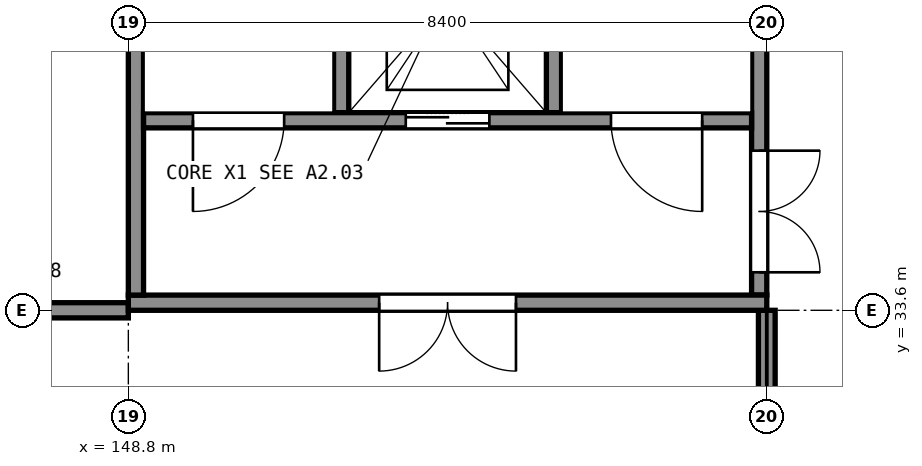
"""IFC4 building model, lengths in metres.
Left out: names, types, materials, properties, quantities, classifications, styles, units other than length and angle.
Written with IfcOpenShell. Run it as: python <this file> out.ifc"""

import sys

from ifc_helpers import new_model, si_unit, direction, frame, frame_2d, origin, place, context, subcontext, project, spatial, rectangle, extrude, element, fill, save


model = new_model("IFC4")
c1 = context("Model", 3, precision=1e-05, world=origin(), true_north=direction((0.0, 1.0)))
c2 = subcontext(c1, "Body", "Model", "MODEL_VIEW")
j1 = project(units=[si_unit("LENGTHUNIT", "METRE"), si_unit("PLANEANGLEUNIT", "RADIAN")], contexts=[c1])
p1 = place(None, origin())
s1 = spatial("IfcSite", under=j1, at=p1, CompositionType="ELEMENT")
p2 = place(p1, origin())
s2 = spatial("IfcBuilding", under=s1, at=p2, CompositionType="ELEMENT")
p3 = place(p2, origin())
s3 = spatial("IfcBuildingStorey", under=s2, at=p3, CompositionType="ELEMENT", Elevation=0.0)
p4 = place(p3, frame((148.8, 33.7, -1.8), z_axis=(0.0, 0.0, 1.0), x_axis=(1.0, 0.0, 0.0)))
e1 = element("IfcWall", 1, at=p4, inside=s3, PredefinedType="SHEAR", context=c2, shape_type="SweptSolid", body=[
    extrude(rectangle(XDim=8.4, YDim=0.2, at=frame_2d((4.2, 0.0))), origin(), (0.0, 0.0, 1.0), 7.3),
])
p5 = place(p4, frame((3.3, 0.0, 1.8)))
e2 = element("IfcOpeningElement", 2, at=p5, cuts=e1, PredefinedType="OPENING", context=c2, shape_type="SweptSolid", body=[
    extrude(rectangle(XDim=1.8, YDim=2.1, at=frame_2d((0.9, 1.05))), frame((0.0, 0.11, 0.0), z_axis=(0.0, -1.0, 0.0), x_axis=(1.0, 0.0, 0.0)), (0.0, 0.0, 1.0), 0.22),
])
p6 = place(p3, frame((148.9, 33.8, -1.8), z_axis=(0.0, 0.0, 1.0), x_axis=(0.0, 1.0, 0.0)))
e3 = element("IfcWall", 3, at=p6, inside=s3, PredefinedType="SHEAR", context=c2, shape_type="SweptSolid", body=[
    extrude(rectangle(XDim=8.0, YDim=0.2, at=frame_2d((4.0, 0.0))), origin(), (0.0, 0.0, 1.0), 7.3),
])
p7 = place(p3, frame((157.1, 41.8, -1.8), z_axis=(0.0, 0.0, 1.0), x_axis=(0.0, -1.0, 0.0)))
e4 = element("IfcWall", 4, at=p7, inside=s3, PredefinedType="SHEAR", context=c2, shape_type="SweptSolid", body=[
    extrude(rectangle(XDim=8.0, YDim=0.2, at=frame_2d((4.0, 0.0))), origin(), (0.0, 0.0, 1.0), 7.3),
])
p8 = place(p7, frame((6.1, 0.0, 1.8)))
e5 = element("IfcOpeningElement", 5, at=p8, cuts=e4, PredefinedType="OPENING", context=c2, shape_type="SweptSolid", body=[
    extrude(rectangle(XDim=1.6, YDim=2.1, at=frame_2d((0.8, 1.05))), frame((0.0, 0.11, 0.0), z_axis=(0.0, -1.0, 0.0), x_axis=(1.0, 0.0, 0.0)), (0.0, 0.0, 1.0), 0.22),
])
p9 = place(p3, frame((149.0, 36.1, -1.8), z_axis=(0.0, 0.0, 1.0), x_axis=(1.0, 0.0, 0.0)))
e6 = element("IfcWall", 6, at=p9, inside=s3, PredefinedType="SHEAR", context=c2, shape_type="SweptSolid", body=[
    extrude(rectangle(XDim=8.0, YDim=0.2, at=frame_2d((4.0, 0.0))), origin(), (0.0, 0.0, 1.0), 7.3),
])
p10 = place(p9, frame((0.65, 0.0, 1.8)))
e7 = element("IfcOpeningElement", 7, at=p10, cuts=e6, PredefinedType="OPENING", context=c2, shape_type="SweptSolid", body=[
    extrude(rectangle(XDim=1.2, YDim=2.1, at=frame_2d((0.6, 1.05))), frame((0.0, 0.11, 0.0), z_axis=(0.0, -1.0, 0.0), x_axis=(1.0, 0.0, 0.0)), (0.0, 0.0, 1.0), 0.22),
])
p11 = place(p9, frame((6.15, 0.0, 1.8)))
e8 = element("IfcOpeningElement", 8, at=p11, cuts=e6, PredefinedType="OPENING", context=c2, shape_type="SweptSolid", body=[
    extrude(rectangle(XDim=1.2, YDim=2.1, at=frame_2d((0.6, 1.05))), frame((0.0, 0.11, 0.0), z_axis=(0.0, -1.0, 0.0), x_axis=(1.0, 0.0, 0.0)), (0.0, 0.0, 1.0), 0.22),
])
p12 = place(p9, frame((3.45, 0.0, 1.8)))
e9 = element("IfcOpeningElement", 9, at=p12, cuts=e6, PredefinedType="OPENING", context=c2, shape_type="SweptSolid", body=[
    extrude(rectangle(XDim=1.1, YDim=2.1, at=frame_2d((0.55, 1.05))), frame((0.0, 0.11, 0.0), z_axis=(0.0, -1.0, 0.0), x_axis=(1.0, 0.0, 0.0)), (0.0, 0.0, 1.0), 0.22),
])
for number, where, z_axis, x_axis in (
    (10, (151.6, 36.2, -1.8), (0.0, 0.0, 1.0), (0.0, 1.0, 0.0)),
    (11, (154.4, 36.2, -1.8), (0.0, 0.0, 1.0), (0.0, 1.0, 0.0)),
):
    element("IfcWall", number, at=place(p3, frame(where, z_axis=z_axis, x_axis=x_axis)), inside=s3, PredefinedType="SHEAR", context=c2, shape_type="SweptSolid", body=[
        extrude(rectangle(XDim=5.6, YDim=0.2, at=frame_2d((2.8, 0.0))), origin(), (0.0, 0.0, 1.0), 7.3),
    ])
p13 = place(p3, frame((157.2, 25.6, 0.0), z_axis=(0.0, 0.0, 1.0), x_axis=(0.0, 1.0, 0.0)))
e12 = element("IfcWall", 12, at=p13, inside=s3, PredefinedType="SOLIDWALL", context=c2, shape_type="SweptSolid", body=[
    extrude(rectangle(XDim=8.0, YDim=0.22, at=frame_2d((4.0, 0.0))), origin(), (0.0, 0.0, 1.0), 4.44),
])
p14 = place(p13, frame((3.95, 0.0, 2.1)))
e13 = element("IfcOpeningElement", 13, at=p14, cuts=e12, PredefinedType="OPENING", context=c2, shape_type="SweptSolid", body=[
    extrude(rectangle(XDim=1.2, YDim=0.6, at=frame_2d((0.6, 0.3))), frame((0.0, 0.12, 0.0), z_axis=(0.0, -1.0, 0.0), x_axis=(1.0, 0.0, 0.0)), (0.0, 0.0, 1.0), 0.24),
])
p15 = place(p3, frame((144.5, 33.6, 0.0), z_axis=(0.0, 0.0, 1.0), x_axis=(1.0, 0.0, 0.0)))
e14 = element("IfcWall", 14, at=p15, inside=s3, PredefinedType="PARTITIONING", context=c2, shape_type="SweptSolid", body=[
    extrude(rectangle(XDim=4.3, YDim=0.2, at=frame_2d((2.15, 0.0))), origin(), (0.0, 0.0, 1.0), 4.4),
])
p16 = place(p15, frame((1.75, 0.0, 0.0)))
e15 = element("IfcOpeningElement", 15, at=p16, cuts=e14, PredefinedType="OPENING", context=c2, shape_type="SweptSolid", body=[
    extrude(rectangle(XDim=1.0, YDim=2.1, at=frame_2d((0.5, 1.05))), frame((0.0, 0.11, 0.0), z_axis=(0.0, -1.0, 0.0), x_axis=(1.0, 0.0, 0.0)), (0.0, 0.0, 1.0), 0.22),
])
p17 = place(p8, origin())
e16 = element("IfcDoor", 16, at=p17, inside=s3, OperationType="DOUBLE_DOOR_SINGLE_SWING", PredefinedType="DOOR", context=c2, shape_type="SweptSolid", body=[
    extrude(rectangle(XDim=1.6, YDim=2.1, at=frame_2d((0.8, 1.05))), frame((0.0, 0.025, 0.0), z_axis=(0.0, -1.0, 0.0), x_axis=(1.0, 0.0, 0.0)), (0.0, 0.0, 1.0), 0.05),
])
fill(e5, e16)
p18 = place(p5, origin())
e17 = element("IfcDoor", 17, at=p18, inside=s3, OperationType="DOUBLE_DOOR_SINGLE_SWING", PredefinedType="DOOR", context=c2, shape_type="SweptSolid", body=[
    extrude(rectangle(XDim=1.8, YDim=2.1, at=frame_2d((0.9, 1.05))), frame((0.0, 0.025, 0.0), z_axis=(0.0, -1.0, 0.0), x_axis=(1.0, 0.0, 0.0)), (0.0, 0.0, 1.0), 0.05),
])
fill(e2, e17)
p19 = place(p10, origin())
e18 = element("IfcDoor", 18, at=p19, inside=s3, OperationType="SINGLE_SWING_LEFT", PredefinedType="DOOR", context=c2, shape_type="SweptSolid", body=[
    extrude(rectangle(XDim=1.2, YDim=2.1, at=frame_2d((0.6, 1.05))), frame((0.0, 0.025, 0.0), z_axis=(0.0, -1.0, 0.0), x_axis=(1.0, 0.0, 0.0)), (0.0, 0.0, 1.0), 0.05),
])
fill(e7, e18)
p20 = place(p11, origin())
e19 = element("IfcDoor", 19, at=p20, inside=s3, OperationType="SINGLE_SWING_RIGHT", PredefinedType="DOOR", context=c2, shape_type="SweptSolid", body=[
    extrude(rectangle(XDim=1.2, YDim=2.1, at=frame_2d((0.6, 1.05))), frame((0.0, 0.025, 0.0), z_axis=(0.0, -1.0, 0.0), x_axis=(1.0, 0.0, 0.0)), (0.0, 0.0, 1.0), 0.05),
])
fill(e8, e19)
p21 = place(p12, origin())
e20 = element("IfcDoor", 20, at=p21, inside=s3, OperationType="DOUBLE_DOOR_SLIDING", PredefinedType="DOOR", context=c2, shape_type="SweptSolid", body=[
    extrude(rectangle(XDim=1.1, YDim=2.1, at=frame_2d((0.55, 1.05))), frame((0.0, 0.025, 0.0), z_axis=(0.0, -1.0, 0.0), x_axis=(1.0, 0.0, 0.0)), (0.0, 0.0, 1.0), 0.05),
])
fill(e9, e20)
save(model, sys.argv[1])
